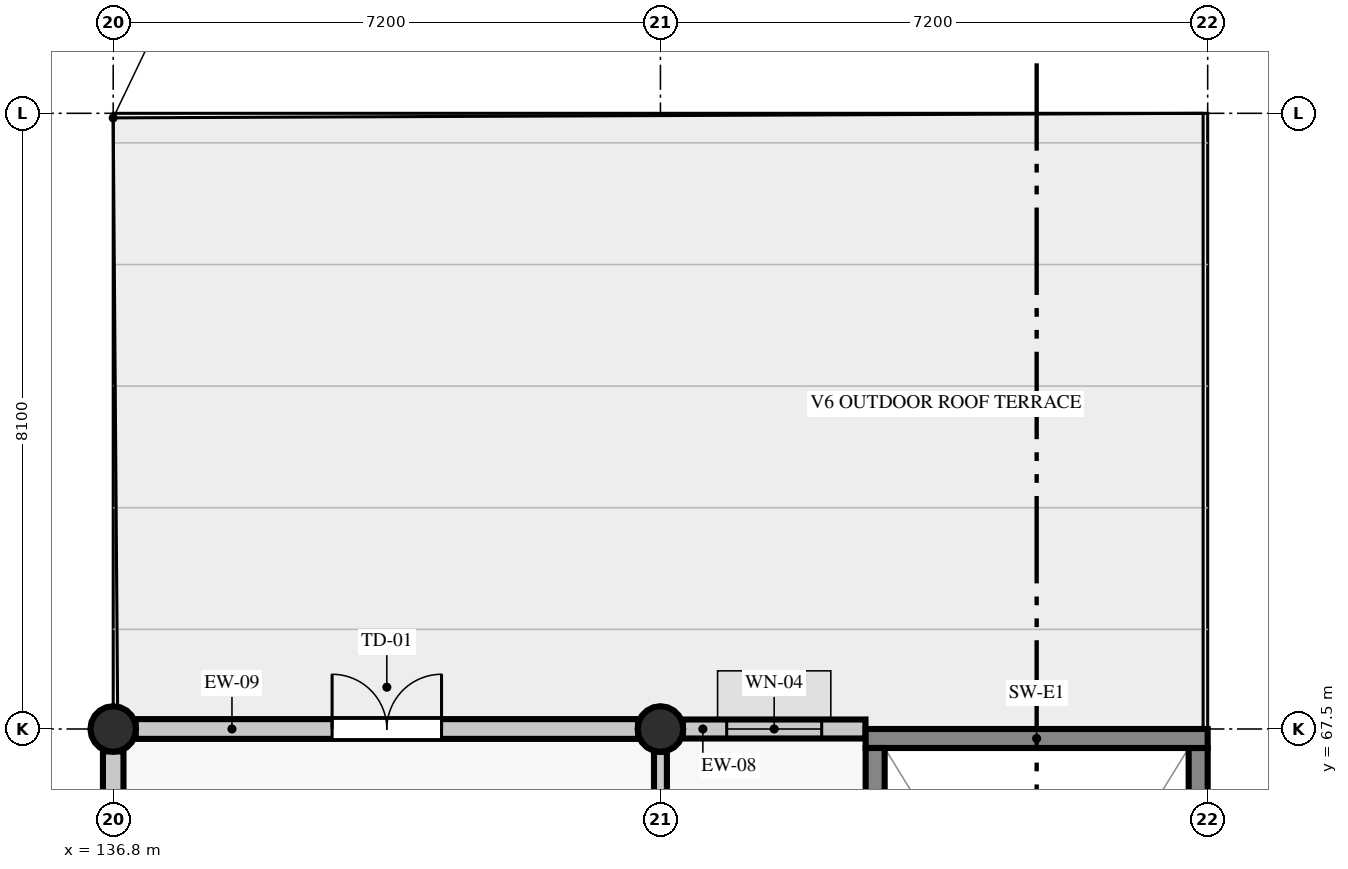
"""IFC4 building model, lengths in metres.
Left out: names, types, materials, properties, quantities, classifications, styles, units other than length and angle.
Written with IfcOpenShell. Run it as: python <this file> out.ifc"""

import sys

from ifc_helpers import new_model, si_unit, direction, frame, frame_2d, origin, origin_2d, place, context, subcontext, project, spatial, rectangle, circle, extrude, element, fill, save


model = new_model("IFC4")
c1 = context("Model", 3, precision=1e-05, world=origin(), true_north=direction((0.0, 1.0)))
c2 = subcontext(c1, "Body", "Model", "MODEL_VIEW")
j1 = project(units=[si_unit("LENGTHUNIT", "METRE"), si_unit("PLANEANGLEUNIT", "RADIAN")], contexts=[c1])
p1 = place(None, origin())
s1 = spatial("IfcSite", under=j1, at=p1, CompositionType="ELEMENT")
p2 = place(p1, origin())
s2 = spatial("IfcBuilding", under=s1, at=p2, CompositionType="ELEMENT")
p3 = place(p2, frame((0.0, 0.0, 9.6)))
s3 = spatial("IfcBuildingStorey", under=s2, at=p3, CompositionType="ELEMENT", Elevation=9.6)
for number, where, z_axis, x_axis in (
    (1, (136.8, 67.5, 0.0), (0.0, 0.0, 1.0), (1.0, 0.0, 0.0)),
    (2, (144.0, 67.5, 0.0), (0.0, 0.0, 1.0), (1.0, 0.0, 0.0)),
):
    element("IfcColumn", number, at=place(p3, frame(where, z_axis=z_axis, x_axis=x_axis)), inside=s3, PredefinedType="COLUMN", context=c2, shape_type="SweptSolid", body=[
        extrude(circle(Radius=0.3, at=origin_2d()), origin(), (0.0, 0.0, 1.0), 4.2),
    ])
p4 = place(p3, frame((146.698, 67.5, 0.0), z_axis=(0.0, 0.0, 1.0), x_axis=(-1.0, 0.0, 0.0)))
e3 = element("IfcWall", 3, at=p4, inside=s3, PredefinedType="STANDARD", context=c2, shape_type="SweptSolid", body=[
    extrude(rectangle(XDim=2.403, YDim=0.25, at=frame_2d((1.202, 0.0))), origin(), (0.0, 0.0, 1.0), 4.2),
])
p5 = place(p4, frame((0.576, 0.0, 0.9)))
e4 = element("IfcOpeningElement", 4, at=p5, cuts=e3, PredefinedType="OPENING", context=c2, shape_type="SweptSolid", body=[
    extrude(rectangle(XDim=1.25, YDim=1.3, at=frame_2d((0.625, 0.65))), frame((0.0, 0.135, 0.0), z_axis=(0.0, -1.0, 0.0), x_axis=(1.0, 0.0, 0.0)), (0.0, 0.0, 1.0), 0.27),
])
p6 = place(p3, frame((143.705, 67.5, 0.0), z_axis=(0.0, 0.0, 1.0), x_axis=(-1.0, 0.0, 0.0)))
e5 = element("IfcWall", 5, at=p6, inside=s3, PredefinedType="STANDARD", context=c2, shape_type="SweptSolid", body=[
    extrude(rectangle(XDim=6.61, YDim=0.26, at=frame_2d((3.305, 0.0))), origin(), (0.0, 0.0, 1.0), 3.55),
])
p7 = place(p6, frame((2.585, 0.0, 0.0)))
e6 = element("IfcOpeningElement", 6, at=p7, cuts=e5, PredefinedType="OPENING", context=c2, shape_type="SweptSolid", body=[
    extrude(rectangle(XDim=1.44, YDim=2.16, at=frame_2d((0.72, 1.08))), frame((0.0, 0.14, 0.0), z_axis=(0.0, -1.0, 0.0), x_axis=(1.0, 0.0, 0.0)), (0.0, 0.0, 1.0), 0.28),
])
p8 = place(p3, frame((136.8, 67.205, 0.0), z_axis=(0.0, 0.0, 1.0), x_axis=(0.0, -1.0, 0.0)))
e7 = element("IfcWall", 7, at=p8, inside=s3, PredefinedType="STANDARD", context=c2, shape_type="SweptSolid", body=[
    extrude(rectangle(XDim=7.51, YDim=0.27, at=frame_2d((3.755, 0.0))), origin(), (0.0, 0.0, 1.0), 3.55),
])
p9 = place(p8, frame((3.08, 0.0, 0.9)))
e8 = element("IfcOpeningElement", 8, at=p9, cuts=e7, PredefinedType="OPENING", context=c2, shape_type="SweptSolid", body=[
    extrude(rectangle(XDim=1.35, YDim=1.3, at=frame_2d((0.675, 0.65))), frame((0.0, 0.145, 0.0), z_axis=(0.0, -1.0, 0.0), x_axis=(1.0, 0.0, 0.0)), (0.0, 0.0, 1.0), 0.29),
])
p10 = place(p3, frame((151.075, 58.95, 0.0), z_axis=(0.0, 0.0, 1.0), x_axis=(0.0, 1.0, 0.0)))
e9 = element("IfcWall", 9, at=p10, inside=s3, PredefinedType="SHEAR", context=c2, shape_type="SweptSolid", body=[
    extrude(rectangle(XDim=8.3, YDim=0.25, at=frame_2d((4.15, 0.0))), origin(), (0.0, 0.0, 1.0), 4.2),
])
p11 = place(p10, frame((0.25, 0.0, 0.92)))
e10 = element("IfcOpeningElement", 10, at=p11, cuts=e9, PredefinedType="OPENING", context=c2, shape_type="SweptSolid", body=[
    extrude(rectangle(XDim=1.18, YDim=1.48, at=frame_2d((0.59, 0.74))), frame((0.0, 0.135, 0.0), z_axis=(0.0, -1.0, 0.0), x_axis=(1.0, 0.0, 0.0)), (0.0, 0.0, 1.0), 0.27),
])
p12 = place(p3, frame((151.2, 67.375, 0.0), z_axis=(0.0, 0.0, 1.0), x_axis=(-1.0, 0.0, 0.0)))
e11 = element("IfcWall", 11, at=p12, inside=s3, PredefinedType="SHEAR", context=c2, shape_type="SweptSolid", body=[
    extrude(rectangle(XDim=4.5, YDim=0.25, at=frame_2d((2.25, 0.0))), origin(), (0.0, 0.0, 1.0), 4.2),
])
p13 = place(p3, frame((146.825, 67.25, 0.0), z_axis=(0.0, 0.0, 1.0), x_axis=(0.0, -1.0, 0.0)))
e12 = element("IfcWall", 12, at=p13, inside=s3, PredefinedType="SHEAR", context=c2, shape_type="SweptSolid", body=[
    extrude(rectangle(XDim=8.3, YDim=0.25, at=frame_2d((4.15, 0.0))), origin(), (0.0, 0.0, 1.0), 4.2),
])
p14 = place(p13, frame((6.5, 0.0, 0.0)))
e13 = element("IfcOpeningElement", 13, at=p14, cuts=e12, PredefinedType="OPENING", context=c2, shape_type="SweptSolid", body=[
    extrude(rectangle(XDim=1.5, YDim=2.15, at=frame_2d((0.75, 1.075))), frame((0.0, 0.135, 0.0), z_axis=(0.0, -1.0, 0.0), x_axis=(1.0, 0.0, 0.0)), (0.0, 0.0, 1.0), 0.27),
])
p15 = place(p3, frame((144.0, 43.5, 0.0), z_axis=(0.0, 0.0, 1.0), x_axis=(0.0, 1.0, 0.0)))
e14 = element("IfcWall", 14, at=p15, inside=s3, PredefinedType="PARTITIONING", context=c2, shape_type="SweptSolid", body=[
    extrude(rectangle(XDim=23.7, YDim=0.17, at=frame_2d((11.85, 0.0))), origin(), (0.0, 0.0, 1.0), 3.75),
])
p16 = place(p15, frame((3.243, 0.0, 0.0)))
e15 = element("IfcOpeningElement", 15, at=p16, cuts=e14, PredefinedType="OPENING", context=c2, shape_type="SweptSolid", body=[
    extrude(rectangle(XDim=1.1, YDim=2.13, at=frame_2d((0.55, 1.065))), frame((0.0, 0.095, 0.0), z_axis=(0.0, -1.0, 0.0), x_axis=(1.0, 0.0, 0.0)), (0.0, 0.0, 1.0), 0.19),
])
p17 = place(p15, frame((8.95, 0.0, 0.0)))
e16 = element("IfcOpeningElement", 16, at=p17, cuts=e14, PredefinedType="OPENING", context=c2, shape_type="SweptSolid", body=[
    extrude(rectangle(XDim=0.9, YDim=2.13, at=frame_2d((0.45, 1.065))), frame((0.0, 0.095, 0.0), z_axis=(0.0, -1.0, 0.0), x_axis=(1.0, 0.0, 0.0)), (0.0, 0.0, 1.0), 0.19),
])
p18 = place(p15, frame((11.615, 0.0, 0.0)))
e17 = element("IfcOpeningElement", 17, at=p18, cuts=e14, PredefinedType="OPENING", context=c2, shape_type="SweptSolid", body=[
    extrude(rectangle(XDim=0.92, YDim=2.18, at=frame_2d((0.46, 1.09))), frame((0.0, 0.095, 0.0), z_axis=(0.0, -1.0, 0.0), x_axis=(1.0, 0.0, 0.0)), (0.0, 0.0, 1.0), 0.19),
])
p19 = place(p15, frame((13.93, 0.0, 0.0)))
e18 = element("IfcOpeningElement", 18, at=p19, cuts=e14, PredefinedType="OPENING", context=c2, shape_type="SweptSolid", body=[
    extrude(rectangle(XDim=0.94, YDim=2.08, at=frame_2d((0.47, 1.04))), frame((0.0, 0.095, 0.0), z_axis=(0.0, -1.0, 0.0), x_axis=(1.0, 0.0, 0.0)), (0.0, 0.0, 1.0), 0.19),
])
p20 = place(p15, frame((19.393, 0.0, 0.0)))
e19 = element("IfcOpeningElement", 19, at=p20, cuts=e14, PredefinedType="OPENING", context=c2, shape_type="SweptSolid", body=[
    extrude(rectangle(XDim=1.03, YDim=2.18, at=frame_2d((0.515, 1.09))), frame((0.0, 0.095, 0.0), z_axis=(0.0, -1.0, 0.0), x_axis=(1.0, 0.0, 0.0)), (0.0, 0.0, 1.0), 0.19),
])
p21 = place(p5, origin())
e20 = element("IfcWindow", 20, at=p21, inside=s3, PartitioningType="SINGLE_PANEL", PredefinedType="WINDOW", context=c2, shape_type="SweptSolid", body=[
    extrude(rectangle(XDim=1.25, YDim=1.3, at=frame_2d((0.625, 0.65))), frame((0.0, 0.03, 0.0), z_axis=(0.0, -1.0, 0.0), x_axis=(1.0, 0.0, 0.0)), (0.0, 0.0, 1.0), 0.06),
])
fill(e4, e20)
p22 = place(p7, frame((1.44, 0.0, 0.0), z_axis=(0.0, 0.0, 1.0), x_axis=(-1.0, 0.0, 0.0)))
e21 = element("IfcDoor", 21, at=p22, inside=s3, OperationType="DOUBLE_DOOR_SINGLE_SWING", PredefinedType="DOOR", context=c2, shape_type="SweptSolid", body=[
    extrude(rectangle(XDim=1.44, YDim=2.16, at=frame_2d((0.72, 1.08))), frame((0.0, 0.025, 0.0), z_axis=(0.0, -1.0, 0.0), x_axis=(1.0, 0.0, 0.0)), (0.0, 0.0, 1.0), 0.05),
])
fill(e6, e21)
save(model, sys.argv[1])
